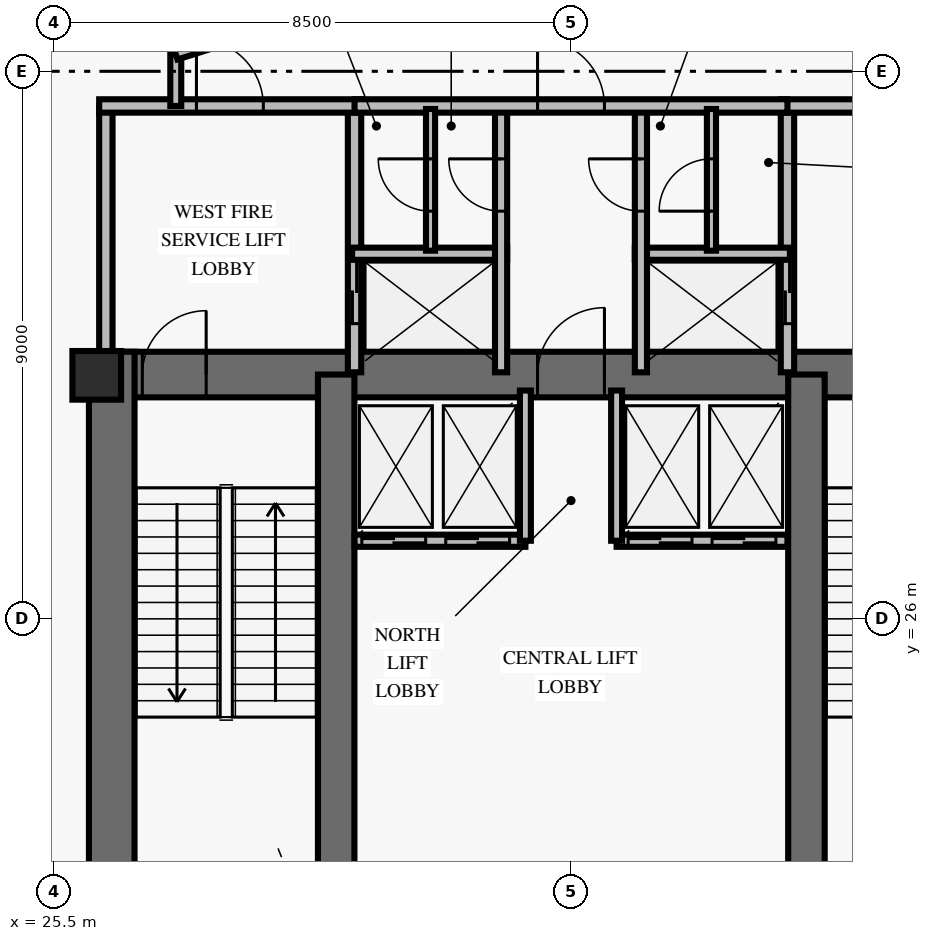
"""IFC4 building model, lengths in metres.
Left out: names, types, materials, properties, quantities, classifications, styles, units other than length and angle.
Written with IfcOpenShell. Run it as: python <this file> out.ifc"""

import sys

from ifc_helpers import new_model, si_unit, direction, frame, frame_2d, origin, origin_2d, place, context, subcontext, project, spatial, rectangle, extrude, element, fill, save


model = new_model("IFC4")
c1 = context("Model", 3, precision=1e-05, world=origin(), true_north=direction((0.0, 1.0)))
c2 = subcontext(c1, "Body", "Model", "MODEL_VIEW")
j1 = project(units=[si_unit("LENGTHUNIT", "METRE"), si_unit("PLANEANGLEUNIT", "RADIAN")], contexts=[c1])
p1 = place(None, origin())
s1 = spatial("IfcSite", under=j1, at=p1, CompositionType="ELEMENT")
p2 = place(p1, origin())
s2 = spatial("IfcBuilding", under=s1, at=p2, CompositionType="ELEMENT")
p3 = place(p2, frame((0.0, 0.0, 220.4)))
s3 = spatial("IfcBuildingStorey", under=s2, at=p3, CompositionType="ELEMENT", Elevation=220.4)
p4 = place(p3, frame((26.072, 30.013, 0.0), z_axis=(0.0, 0.0, 1.0), x_axis=(1.0, 0.0, 0.0)))
e1 = element("IfcWall", 1, at=p4, inside=s3, PredefinedType="SHEAR", context=c2, shape_type="SweptSolid", body=[
    extrude(rectangle(XDim=15.866, YDim=0.75, at=frame_2d((7.933, 0.0))), origin(), (0.0, 0.0, 1.0), 5.0),
])
p5 = place(p4, frame((0.878, 0.0, 0.0)))
e2 = element("IfcOpeningElement", 2, at=p5, cuts=e1, PredefinedType="OPENING", context=c2, shape_type="SweptSolid", body=[
    extrude(rectangle(XDim=1.05, YDim=2.15, at=frame_2d((0.525, 1.075))), frame((0.0, 0.385, 0.0), z_axis=(0.0, -1.0, 0.0), x_axis=(1.0, 0.0, 0.0)), (0.0, 0.0, 1.0), 0.77),
])
p6 = place(p4, frame((13.928, 0.0, 0.0)))
e3 = element("IfcOpeningElement", 3, at=p6, cuts=e1, PredefinedType="OPENING", context=c2, shape_type="SweptSolid", body=[
    extrude(rectangle(XDim=1.05, YDim=2.15, at=frame_2d((0.525, 1.075))), frame((0.0, 0.385, 0.0), z_axis=(0.0, -1.0, 0.0), x_axis=(1.0, 0.0, 0.0)), (0.0, 0.0, 1.0), 0.77),
])
p7 = place(p4, frame((7.378, 0.0, 0.0)))
e4 = element("IfcOpeningElement", 4, at=p7, cuts=e1, PredefinedType="OPENING", context=c2, shape_type="SweptSolid", body=[
    extrude(rectangle(XDim=1.1, YDim=2.15, at=frame_2d((0.55, 1.075))), frame((0.0, 0.385, 0.0), z_axis=(0.0, -1.0, 0.0), x_axis=(1.0, 0.0, 0.0)), (0.0, 0.0, 1.0), 0.77),
])
p8 = place(p3, frame((26.447, 19.812, 0.0), z_axis=(0.0, 0.0, 1.0), x_axis=(0.0, 1.0, 0.0)))
e5 = element("IfcWall", 5, at=p8, inside=s3, PredefinedType="SHEAR", context=c2, shape_type="SweptSolid", body=[
    extrude(rectangle(XDim=10.576, YDim=0.75, at=frame_2d((5.288, 0.0))), origin(), (0.0, 0.0, 1.0), 5.0),
])
for number, where, z_axis, x_axis in (
    (6, (30.138, 20.187, 0.0), (0.0, 0.0, 1.0), (0.0, 1.0, 0.0)),
    (7, (37.872, 20.187, 0.0), (0.0, 0.0, 1.0), (0.0, 1.0, 0.0)),
):
    element("IfcWall", number, at=place(p3, frame(where, z_axis=z_axis, x_axis=x_axis)), inside=s3, PredefinedType="SHEAR", context=c2, shape_type="SweptSolid", body=[
        extrude(rectangle(XDim=9.826, YDim=0.6, at=frame_2d((4.913, 0.0))), origin(), (0.0, 0.0, 1.0), 5.0),
    ])
p9 = place(p3, frame((26.2, 30.0, 0.0), z_axis=(0.0, 0.0, 1.0), x_axis=(1.0, 0.0, 0.0)))
e8 = element("IfcColumn", 8, at=p9, inside=s3, PredefinedType="PILASTER", context=c2, shape_type="SweptSolid", body=[
    extrude(rectangle(XDim=0.8, YDim=0.8, at=origin_2d()), origin(), (0.0, 0.0, 1.0), 5.0),
])
p10 = place(p3, frame((26.35, 30.05, 0.0), z_axis=(0.0, 0.0, 1.0), x_axis=(0.0, 1.0, 0.0)))
e9 = element("IfcWall", 9, at=p10, inside=s3, PredefinedType="SOLIDWALL", context=c2, shape_type="SweptSolid", body=[
    extrude(rectangle(XDim=4.38, YDim=0.22, at=frame_2d((2.19, 0.0))), origin(), (0.0, 0.0, 1.0), 2.8),
])
p11 = place(p3, frame((30.44, 30.05, 0.0), z_axis=(0.0, 0.0, 1.0), x_axis=(0.0, 1.0, 0.0)))
e10 = element("IfcWall", 10, at=p11, inside=s3, PredefinedType="SOLIDWALL", context=c2, shape_type="SweptSolid", body=[
    extrude(rectangle(XDim=4.38, YDim=0.22, at=frame_2d((2.19, 0.0))), origin(), (0.0, 0.0, 1.0), 2.8),
])
p12 = place(p11, frame((0.8, 0.0, 0.0)))
e11 = element("IfcOpeningElement", 11, at=p12, cuts=e10, PredefinedType="OPENING", context=c2, shape_type="SweptSolid", body=[
    extrude(rectangle(XDim=1.05, YDim=2.1, at=frame_2d((0.525, 1.05))), frame((0.0, 0.12, 0.0), z_axis=(0.0, -1.0, 0.0), x_axis=(1.0, 0.0, 0.0)), (0.0, 0.0, 1.0), 0.24),
])
p13 = place(p3, frame((26.24, 34.43, 0.0), z_axis=(0.0, 0.0, 1.0), x_axis=(1.0, 0.0, 0.0)))
e12 = element("IfcWall", 12, at=p13, inside=s3, PredefinedType="SOLIDWALL", context=c2, shape_type="SweptSolid", body=[
    extrude(rectangle(XDim=4.31, YDim=0.22, at=frame_2d((2.155, 0.0))), origin(), (0.0, 0.0, 1.0), 2.8),
])
p14 = place(p13, frame((1.6, 0.0, 0.0)))
e13 = element("IfcOpeningElement", 13, at=p14, cuts=e12, PredefinedType="OPENING", context=c2, shape_type="SweptSolid", body=[
    extrude(rectangle(XDim=1.1, YDim=2.15, at=frame_2d((0.55, 1.075))), frame((0.0, 0.12, 0.0), z_axis=(0.0, -1.0, 0.0), x_axis=(1.0, 0.0, 0.0)), (0.0, 0.0, 1.0), 0.24),
])
p15 = place(p3, frame((30.4, 32.0, 0.0), z_axis=(0.0, 0.0, 1.0), x_axis=(1.0, 0.0, 0.0)))
e14 = element("IfcWall", 14, at=p15, inside=s3, PredefinedType="SOLIDWALL", context=c2, shape_type="SweptSolid", body=[
    extrude(rectangle(XDim=2.55, YDim=0.2, at=frame_2d((1.275, 0.0))), origin(), (0.0, 0.0, 1.0), 2.8),
])
p16 = place(p3, frame((32.85, 30.05, 0.0), z_axis=(0.0, 0.0, 1.0), x_axis=(0.0, 1.0, 0.0)))
e15 = element("IfcWall", 15, at=p16, inside=s3, PredefinedType="SOLIDWALL", context=c2, shape_type="SweptSolid", body=[
    extrude(rectangle(XDim=4.38, YDim=0.2, at=frame_2d((2.19, 0.0))), origin(), (0.0, 0.0, 1.0), 2.8),
])
p17 = place(p16, frame((2.65, 0.0, 0.0)))
e16 = element("IfcOpeningElement", 16, at=p17, cuts=e15, PredefinedType="OPENING", context=c2, shape_type="SweptSolid", body=[
    extrude(rectangle(XDim=0.86, YDim=2.05, at=frame_2d((0.43, 1.025))), frame((0.0, 0.11, 0.0), z_axis=(0.0, -1.0, 0.0), x_axis=(1.0, 0.0, 0.0)), (0.0, 0.0, 1.0), 0.22),
])
p18 = place(p3, frame((37.56, 30.05, 0.0), z_axis=(0.0, 0.0, 1.0), x_axis=(0.0, 1.0, 0.0)))
e17 = element("IfcWall", 17, at=p18, inside=s3, PredefinedType="SOLIDWALL", context=c2, shape_type="SweptSolid", body=[
    extrude(rectangle(XDim=4.38, YDim=0.22, at=frame_2d((2.19, 0.0))), origin(), (0.0, 0.0, 1.0), 2.8),
])
p19 = place(p18, frame((0.8, 0.0, 0.0)))
e18 = element("IfcOpeningElement", 18, at=p19, cuts=e17, PredefinedType="OPENING", context=c2, shape_type="SweptSolid", body=[
    extrude(rectangle(XDim=1.05, YDim=2.1, at=frame_2d((0.525, 1.05))), frame((0.0, 0.12, 0.0), z_axis=(0.0, -1.0, 0.0), x_axis=(1.0, 0.0, 0.0)), (0.0, 0.0, 1.0), 0.24),
])
p20 = place(p3, frame((37.45, 34.43, 0.0), z_axis=(0.0, 0.0, 1.0), x_axis=(1.0, 0.0, 0.0)))
e19 = element("IfcWall", 19, at=p20, inside=s3, PredefinedType="SOLIDWALL", context=c2, shape_type="SweptSolid", body=[
    extrude(rectangle(XDim=4.31, YDim=0.22, at=frame_2d((2.155, 0.0))), origin(), (0.0, 0.0, 1.0), 2.8),
])
p21 = place(p20, frame((1.6, 0.0, 0.0)))
e20 = element("IfcOpeningElement", 20, at=p21, cuts=e19, PredefinedType="OPENING", context=c2, shape_type="SweptSolid", body=[
    extrude(rectangle(XDim=1.1, YDim=2.15, at=frame_2d((0.55, 1.075))), frame((0.0, 0.12, 0.0), z_axis=(0.0, -1.0, 0.0), x_axis=(1.0, 0.0, 0.0)), (0.0, 0.0, 1.0), 0.24),
])
p22 = place(p3, frame((35.05, 32.0, 0.0), z_axis=(0.0, 0.0, 1.0), x_axis=(1.0, 0.0, 0.0)))
e21 = element("IfcWall", 21, at=p22, inside=s3, PredefinedType="SOLIDWALL", context=c2, shape_type="SweptSolid", body=[
    extrude(rectangle(XDim=2.55, YDim=0.2, at=frame_2d((1.275, 0.0))), origin(), (0.0, 0.0, 1.0), 2.8),
])
p23 = place(p3, frame((35.15, 30.05, 0.0), z_axis=(0.0, 0.0, 1.0), x_axis=(0.0, 1.0, 0.0)))
e22 = element("IfcWall", 22, at=p23, inside=s3, PredefinedType="SOLIDWALL", context=c2, shape_type="SweptSolid", body=[
    extrude(rectangle(XDim=4.38, YDim=0.2, at=frame_2d((2.19, 0.0))), origin(), (0.0, 0.0, 1.0), 2.8),
])
p24 = place(p23, frame((2.65, 0.0, 0.0)))
e23 = element("IfcOpeningElement", 23, at=p24, cuts=e22, PredefinedType="OPENING", context=c2, shape_type="SweptSolid", body=[
    extrude(rectangle(XDim=0.86, YDim=2.05, at=frame_2d((0.43, 1.025))), frame((0.0, 0.11, 0.0), z_axis=(0.0, -1.0, 0.0), x_axis=(1.0, 0.0, 0.0)), (0.0, 0.0, 1.0), 0.22),
])
p25 = place(p3, frame((30.44, 34.43, 0.0), z_axis=(0.0, 0.0, 1.0), x_axis=(1.0, 0.0, 0.0)))
e24 = element("IfcWall", 24, at=p25, inside=s3, PredefinedType="SOLIDWALL", context=c2, shape_type="SweptSolid", body=[
    extrude(rectangle(XDim=7.12, YDim=0.22, at=frame_2d((3.56, 0.0))), origin(), (0.0, 0.0, 1.0), 2.8),
])
p26 = place(p25, frame((3.01, 0.0, 0.0)))
e25 = element("IfcOpeningElement", 25, at=p26, cuts=e24, PredefinedType="OPENING", context=c2, shape_type="SweptSolid", body=[
    extrude(rectangle(XDim=1.1, YDim=2.15, at=frame_2d((0.55, 1.075))), frame((0.0, 0.12, 0.0), z_axis=(0.0, -1.0, 0.0), x_axis=(1.0, 0.0, 0.0)), (0.0, 0.0, 1.0), 0.24),
])
p27 = place(p3, frame((31.69, 32.05, 0.0), z_axis=(0.0, 0.0, 1.0), x_axis=(0.0, 1.0, 0.0)))
e26 = element("IfcWall", 26, at=p27, inside=s3, PredefinedType="PARTITIONING", context=c2, shape_type="SweptSolid", body=[
    extrude(rectangle(XDim=2.33, YDim=0.15, at=frame_2d((1.165, 0.0))), origin(), (0.0, 0.0, 1.0), 2.8),
])
p28 = place(p27, frame((0.65, 0.0, 0.0)))
e27 = element("IfcOpeningElement", 27, at=p28, cuts=e26, PredefinedType="OPENING", context=c2, shape_type="SweptSolid", body=[
    extrude(rectangle(XDim=0.86, YDim=2.05, at=frame_2d((0.43, 1.025))), frame((0.0, 0.085, 0.0), z_axis=(0.0, -1.0, 0.0), x_axis=(1.0, 0.0, 0.0)), (0.0, 0.0, 1.0), 0.17),
])
p29 = place(p3, frame((36.31, 32.05, 0.0), z_axis=(0.0, 0.0, 1.0), x_axis=(0.0, 1.0, 0.0)))
e28 = element("IfcWall", 28, at=p29, inside=s3, PredefinedType="PARTITIONING", context=c2, shape_type="SweptSolid", body=[
    extrude(rectangle(XDim=2.33, YDim=0.15, at=frame_2d((1.165, 0.0))), origin(), (0.0, 0.0, 1.0), 2.8),
])
p30 = place(p29, frame((0.65, 0.0, 0.0)))
e29 = element("IfcOpeningElement", 29, at=p30, cuts=e28, PredefinedType="OPENING", context=c2, shape_type="SweptSolid", body=[
    extrude(rectangle(XDim=0.86, YDim=2.05, at=frame_2d((0.43, 1.025))), frame((0.0, 0.085, 0.0), z_axis=(0.0, -1.0, 0.0), x_axis=(1.0, 0.0, 0.0)), (0.0, 0.0, 1.0), 0.17),
])
p31 = place(p3, frame((30.44, 27.28, 0.0), z_axis=(0.0, 0.0, 1.0), x_axis=(1.0, 0.0, 0.0)))
e30 = element("IfcWall", 30, at=p31, inside=s3, PredefinedType="SOLIDWALL", context=c2, shape_type="SweptSolid", body=[
    extrude(rectangle(XDim=2.81, YDim=0.2, at=frame_2d((1.405, 0.0))), origin(), (0.0, 0.0, 1.0), 2.8),
])
p32 = place(p31, frame((0.12, 0.0, 0.0)))
e31 = element("IfcOpeningElement", 31, at=p32, cuts=e30, PredefinedType="OPENING", context=c2, shape_type="SweptSolid", body=[
    extrude(rectangle(XDim=1.05, YDim=2.1, at=frame_2d((0.525, 1.05))), frame((0.0, 0.11, 0.0), z_axis=(0.0, -1.0, 0.0), x_axis=(1.0, 0.0, 0.0)), (0.0, 0.0, 1.0), 0.22),
])
p33 = place(p31, frame((1.5, 0.0, 0.0)))
e32 = element("IfcOpeningElement", 32, at=p33, cuts=e30, PredefinedType="OPENING", context=c2, shape_type="SweptSolid", body=[
    extrude(rectangle(XDim=1.05, YDim=2.1, at=frame_2d((0.525, 1.05))), frame((0.0, 0.11, 0.0), z_axis=(0.0, -1.0, 0.0), x_axis=(1.0, 0.0, 0.0)), (0.0, 0.0, 1.0), 0.22),
])
p34 = place(p3, frame((33.25, 27.28, 0.0), z_axis=(0.0, 0.0, 1.0), x_axis=(0.0, 1.0, 0.0)))
e33 = element("IfcWall", 33, at=p34, inside=s3, PredefinedType="SOLIDWALL", context=c2, shape_type="SweptSolid", body=[
    extrude(rectangle(XDim=2.47, YDim=0.18, at=frame_2d((1.235, 0.0))), origin(), (0.0, 0.0, 1.0), 2.8),
])
p35 = place(p3, frame((34.75, 27.28, 0.0), z_axis=(0.0, 0.0, 1.0), x_axis=(1.0, 0.0, 0.0)))
e34 = element("IfcWall", 34, at=p35, inside=s3, PredefinedType="SOLIDWALL", context=c2, shape_type="SweptSolid", body=[
    extrude(rectangle(XDim=2.81, YDim=0.2, at=frame_2d((1.405, 0.0))), origin(), (0.0, 0.0, 1.0), 2.8),
])
p36 = place(p35, frame((0.19, 0.0, 0.0)))
e35 = element("IfcOpeningElement", 35, at=p36, cuts=e34, PredefinedType="OPENING", context=c2, shape_type="SweptSolid", body=[
    extrude(rectangle(XDim=1.05, YDim=2.1, at=frame_2d((0.525, 1.05))), frame((0.0, 0.11, 0.0), z_axis=(0.0, -1.0, 0.0), x_axis=(1.0, 0.0, 0.0)), (0.0, 0.0, 1.0), 0.22),
])
p37 = place(p35, frame((1.57, 0.0, 0.0)))
e36 = element("IfcOpeningElement", 36, at=p37, cuts=e34, PredefinedType="OPENING", context=c2, shape_type="SweptSolid", body=[
    extrude(rectangle(XDim=1.05, YDim=2.1, at=frame_2d((0.525, 1.05))), frame((0.0, 0.11, 0.0), z_axis=(0.0, -1.0, 0.0), x_axis=(1.0, 0.0, 0.0)), (0.0, 0.0, 1.0), 0.22),
])
p38 = place(p3, frame((34.75, 27.28, 0.0), z_axis=(0.0, 0.0, 1.0), x_axis=(0.0, 1.0, 0.0)))
e37 = element("IfcWall", 37, at=p38, inside=s3, PredefinedType="SOLIDWALL", context=c2, shape_type="SweptSolid", body=[
    extrude(rectangle(XDim=2.47, YDim=0.18, at=frame_2d((1.235, 0.0))), origin(), (0.0, 0.0, 1.0), 2.8),
])
p39 = place(p3, frame((27.5, 34.43, 0.0), z_axis=(0.0, 0.0, 1.0), x_axis=(0.0, 1.0, 0.0)))
e38 = element("IfcWall", 38, at=p39, inside=s3, PredefinedType="PARTITIONING", context=c2, shape_type="SweptSolid", body=[
    extrude(rectangle(XDim=0.85, YDim=0.18, at=frame_2d((0.425, 0.0))), origin(), (0.0, 0.0, 1.0), 2.8),
])
p40 = place(p3, frame((27.5, 35.28, 0.0), z_axis=(0.0, 0.0, 1.0), x_axis=(0.953691418528, 0.300786765376, 0.0)))
e39 = element("IfcWall", 39, at=p40, inside=s3, PredefinedType="PARTITIONING", context=c2, shape_type="SweptSolid", body=[
    extrude(rectangle(XDim=6.816, YDim=0.18, at=frame_2d((3.408, 0.0))), origin(), (0.0, 0.0, 1.0), 2.8),
])
p41 = place(p40, frame((2.858, 0.0, 0.0)))
e40 = element("IfcOpeningElement", 40, at=p41, cuts=e39, PredefinedType="OPENING", context=c2, shape_type="SweptSolid", body=[
    extrude(rectangle(XDim=1.1, YDim=2.15, at=frame_2d((0.55, 1.075))), frame((0.0, 0.1, 0.0), z_axis=(0.0, -1.0, 0.0), x_axis=(1.0, 0.0, 0.0)), (0.0, 0.0, 1.0), 0.2),
])
p42 = place(p3, frame((34.0, 37.33, 0.0), z_axis=(0.0, 0.0, 1.0), x_axis=(0.953691418528, -0.300786765376, 0.0)))
e41 = element("IfcWall", 41, at=p42, inside=s3, PredefinedType="PARTITIONING", context=c2, shape_type="SweptSolid", body=[
    extrude(rectangle(XDim=6.816, YDim=0.18, at=frame_2d((3.408, 0.0))), origin(), (0.0, 0.0, 1.0), 2.8),
])
p43 = place(p42, frame((2.858, 0.0, 0.0)))
e42 = element("IfcOpeningElement", 42, at=p43, cuts=e41, PredefinedType="OPENING", context=c2, shape_type="SweptSolid", body=[
    extrude(rectangle(XDim=1.1, YDim=2.15, at=frame_2d((0.55, 1.075))), frame((0.0, 0.1, 0.0), z_axis=(0.0, -1.0, 0.0), x_axis=(1.0, 0.0, 0.0)), (0.0, 0.0, 1.0), 0.2),
])
p44 = place(p3, frame((24.261, 34.566, 0.0), z_axis=(0.0, 0.0, 1.0), x_axis=(0.707106781187, 0.707106781187, 0.0)))
e43 = element("IfcWall", 43, at=p44, inside=s3, PredefinedType="SOLIDWALL", context=c2, shape_type="SweptSolid", body=[
    extrude(rectangle(XDim=1.659, YDim=0.2, at=frame_2d((0.83, 0.0))), origin(), (0.0, 0.0, 1.0), 2.8),
])
p45 = place(p44, frame((0.304, 0.0, 0.0)))
e44 = element("IfcOpeningElement", 44, at=p45, cuts=e43, PredefinedType="OPENING", context=c2, shape_type="SweptSolid", body=[
    extrude(rectangle(XDim=1.05, YDim=2.15, at=frame_2d((0.525, 1.075))), frame((0.0, 0.11, 0.0), z_axis=(0.0, -1.0, 0.0), x_axis=(1.0, 0.0, 0.0)), (0.0, 0.0, 1.0), 0.22),
])
p46 = place(p5, origin())
e45 = element("IfcDoor", 45, at=p46, inside=s3, OperationType="SINGLE_SWING_RIGHT", PredefinedType="DOOR", context=c2, shape_type="SweptSolid", body=[
    extrude(rectangle(XDim=1.05, YDim=2.15, at=frame_2d((0.525, 1.075))), frame((0.0, 0.025, 0.0), z_axis=(0.0, -1.0, 0.0), x_axis=(1.0, 0.0, 0.0)), (0.0, 0.0, 1.0), 0.05),
])
fill(e2, e45)
p47 = place(p7, origin())
e46 = element("IfcDoor", 46, at=p47, inside=s3, OperationType="SINGLE_SWING_RIGHT", PredefinedType="DOOR", context=c2, shape_type="SweptSolid", body=[
    extrude(rectangle(XDim=1.1, YDim=2.15, at=frame_2d((0.55, 1.075))), frame((0.0, 0.025, 0.0), z_axis=(0.0, -1.0, 0.0), x_axis=(1.0, 0.0, 0.0)), (0.0, 0.0, 1.0), 0.05),
])
fill(e4, e46)
p48 = place(p14, origin())
e47 = element("IfcDoor", 47, at=p48, inside=s3, OperationType="SINGLE_SWING_LEFT", PredefinedType="DOOR", context=c2, shape_type="SweptSolid", body=[
    extrude(rectangle(XDim=1.1, YDim=2.15, at=frame_2d((0.55, 1.075))), frame((0.0, 0.025, 0.0), z_axis=(0.0, -1.0, 0.0), x_axis=(1.0, 0.0, 0.0)), (0.0, 0.0, 1.0), 0.05),
])
fill(e13, e47)
p49 = place(p12, origin())
e48 = element("IfcDoor", 48, at=p49, inside=s3, OperationType="DOUBLE_DOOR_SLIDING", PredefinedType="USERDEFINED", context=c2, shape_type="SweptSolid", body=[
    extrude(rectangle(XDim=1.05, YDim=2.1, at=frame_2d((0.525, 1.05))), frame((0.0, 0.025, 0.0), z_axis=(0.0, -1.0, 0.0), x_axis=(1.0, 0.0, 0.0)), (0.0, 0.0, 1.0), 0.05),
])
fill(e11, e48)
p50 = place(p17, origin())
e49 = element("IfcDoor", 49, at=p50, inside=s3, OperationType="SINGLE_SWING_RIGHT", PredefinedType="TRAPDOOR", context=c2, shape_type="SweptSolid", body=[
    extrude(rectangle(XDim=0.86, YDim=2.05, at=frame_2d((0.43, 1.025))), frame((0.0, 0.025, 0.0), z_axis=(0.0, -1.0, 0.0), x_axis=(1.0, 0.0, 0.0)), (0.0, 0.0, 1.0), 0.05),
])
fill(e16, e49)
p51 = place(p19, origin())
e50 = element("IfcDoor", 50, at=p51, inside=s3, OperationType="DOUBLE_DOOR_SLIDING", PredefinedType="USERDEFINED", context=c2, shape_type="SweptSolid", body=[
    extrude(rectangle(XDim=1.05, YDim=2.1, at=frame_2d((0.525, 1.05))), frame((0.0, 0.025, 0.0), z_axis=(0.0, -1.0, 0.0), x_axis=(1.0, 0.0, 0.0)), (0.0, 0.0, 1.0), 0.05),
])
fill(e18, e50)
p52 = place(p24, origin())
e51 = element("IfcDoor", 51, at=p52, inside=s3, OperationType="SINGLE_SWING_RIGHT", PredefinedType="TRAPDOOR", context=c2, shape_type="SweptSolid", body=[
    extrude(rectangle(XDim=0.86, YDim=2.05, at=frame_2d((0.43, 1.025))), frame((0.0, 0.025, 0.0), z_axis=(0.0, -1.0, 0.0), x_axis=(1.0, 0.0, 0.0)), (0.0, 0.0, 1.0), 0.05),
])
fill(e23, e51)
p53 = place(p26, origin())
e52 = element("IfcDoor", 52, at=p53, inside=s3, OperationType="SINGLE_SWING_LEFT", PredefinedType="DOOR", context=c2, shape_type="SweptSolid", body=[
    extrude(rectangle(XDim=1.1, YDim=2.15, at=frame_2d((0.55, 1.075))), frame((0.0, 0.025, 0.0), z_axis=(0.0, -1.0, 0.0), x_axis=(1.0, 0.0, 0.0)), (0.0, 0.0, 1.0), 0.05),
])
fill(e25, e52)
p54 = place(p28, origin())
e53 = element("IfcDoor", 53, at=p54, inside=s3, OperationType="SINGLE_SWING_RIGHT", PredefinedType="TRAPDOOR", context=c2, shape_type="SweptSolid", body=[
    extrude(rectangle(XDim=0.86, YDim=2.05, at=frame_2d((0.43, 1.025))), frame((0.0, 0.025, 0.0), z_axis=(0.0, -1.0, 0.0), x_axis=(1.0, 0.0, 0.0)), (0.0, 0.0, 1.0), 0.05),
])
fill(e27, e53)
p55 = place(p30, origin())
e54 = element("IfcDoor", 54, at=p55, inside=s3, OperationType="SINGLE_SWING_LEFT", PredefinedType="TRAPDOOR", context=c2, shape_type="SweptSolid", body=[
    extrude(rectangle(XDim=0.86, YDim=2.05, at=frame_2d((0.43, 1.025))), frame((0.0, 0.025, 0.0), z_axis=(0.0, -1.0, 0.0), x_axis=(1.0, 0.0, 0.0)), (0.0, 0.0, 1.0), 0.05),
])
fill(e29, e54)
p56 = place(p32, origin())
e55 = element("IfcDoor", 55, at=p56, inside=s3, OperationType="DOUBLE_DOOR_SLIDING", PredefinedType="USERDEFINED", context=c2, shape_type="SweptSolid", body=[
    extrude(rectangle(XDim=1.05, YDim=2.1, at=frame_2d((0.525, 1.05))), frame((0.0, 0.025, 0.0), z_axis=(0.0, -1.0, 0.0), x_axis=(1.0, 0.0, 0.0)), (0.0, 0.0, 1.0), 0.05),
])
fill(e31, e55)
p57 = place(p33, origin())
e56 = element("IfcDoor", 56, at=p57, inside=s3, OperationType="DOUBLE_DOOR_SLIDING", PredefinedType="USERDEFINED", context=c2, shape_type="SweptSolid", body=[
    extrude(rectangle(XDim=1.05, YDim=2.1, at=frame_2d((0.525, 1.05))), frame((0.0, 0.025, 0.0), z_axis=(0.0, -1.0, 0.0), x_axis=(1.0, 0.0, 0.0)), (0.0, 0.0, 1.0), 0.05),
])
fill(e32, e56)
p58 = place(p36, origin())
e57 = element("IfcDoor", 57, at=p58, inside=s3, OperationType="DOUBLE_DOOR_SLIDING", PredefinedType="USERDEFINED", context=c2, shape_type="SweptSolid", body=[
    extrude(rectangle(XDim=1.05, YDim=2.1, at=frame_2d((0.525, 1.05))), frame((0.0, 0.025, 0.0), z_axis=(0.0, -1.0, 0.0), x_axis=(1.0, 0.0, 0.0)), (0.0, 0.0, 1.0), 0.05),
])
fill(e35, e57)
p59 = place(p37, origin())
e58 = element("IfcDoor", 58, at=p59, inside=s3, OperationType="DOUBLE_DOOR_SLIDING", PredefinedType="USERDEFINED", context=c2, shape_type="SweptSolid", body=[
    extrude(rectangle(XDim=1.05, YDim=2.1, at=frame_2d((0.525, 1.05))), frame((0.0, 0.025, 0.0), z_axis=(0.0, -1.0, 0.0), x_axis=(1.0, 0.0, 0.0)), (0.0, 0.0, 1.0), 0.05),
])
fill(e36, e58)
save(model, sys.argv[1])
